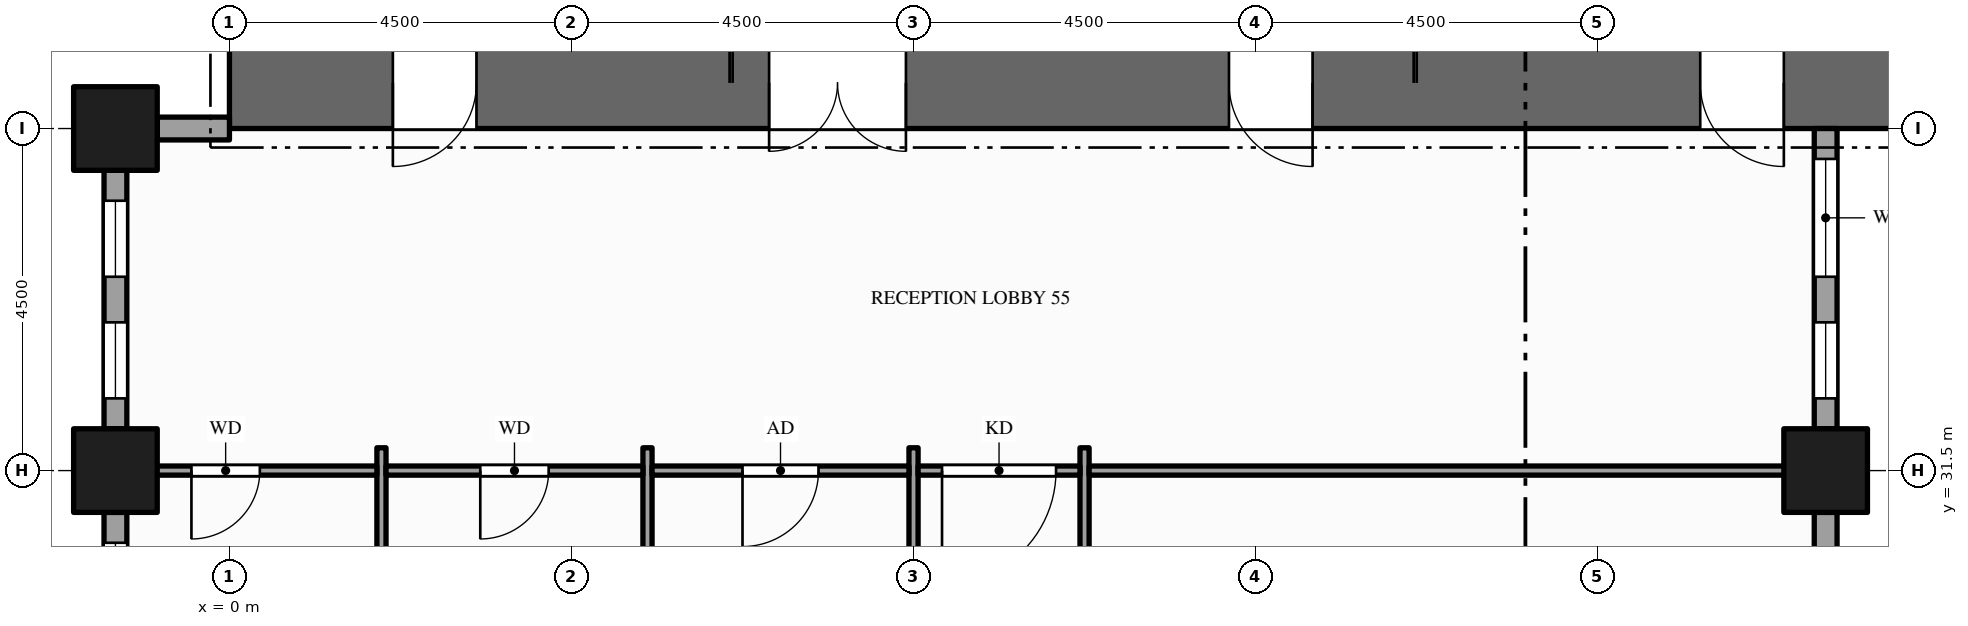
"""IFC4 building model, lengths in metres.
Left out: names, types, materials, properties, quantities, classifications, styles, units other than length and angle.
Written with IfcOpenShell. Run it as: python <this file> out.ifc"""

import sys

from ifc_helpers import new_model, si_unit, direction, frame, frame_2d, origin, origin_2d, place, context, subcontext, project, spatial, rectangle, hollow_rectangle, extrude, element, fill, save


model = new_model("IFC4")
c1 = context("Model", 3, precision=1e-05, world=origin(), true_north=direction((0.0, 1.0)))
c2 = subcontext(c1, "Body", "Model", "MODEL_VIEW")
j1 = project(units=[si_unit("LENGTHUNIT", "METRE"), si_unit("PLANEANGLEUNIT", "RADIAN")], contexts=[c1])
p1 = place(None, origin())
s1 = spatial("IfcSite", under=j1, at=p1, CompositionType="ELEMENT")
p2 = place(p1, origin())
s2 = spatial("IfcBuilding", under=s1, at=p2, CompositionType="ELEMENT")
p3 = place(p2, frame((0.0, 0.0, 73.0)))
s3 = spatial("IfcBuildingStorey", under=s2, at=p3, CompositionType="ELEMENT", Elevation=73.0)
p4 = place(p3, frame((0.0, 36.6, -0.15), z_axis=(0.0, 0.0, 1.0), x_axis=(1.0, 0.0, 0.0)))
e1 = element("IfcWall", 1, at=p4, inside=s3, PredefinedType="SHEAR", context=c2, shape_type="SweptSolid", body=[
    extrude(rectangle(XDim=22.5, YDim=1.2, at=frame_2d((11.25, 0.0))), origin(), (0.0, 0.0, 1.0), 4.0),
])
p5 = place(p4, frame((7.1, 0.0, 0.15)))
e2 = element("IfcOpeningElement", 2, at=p5, cuts=e1, PredefinedType="OPENING", context=c2, shape_type="SweptSolid", body=[
    extrude(rectangle(XDim=1.8, YDim=2.1, at=frame_2d((0.9, 1.05))), frame((0.0, 0.61, 0.0), z_axis=(0.0, -1.0, 0.0), x_axis=(1.0, 0.0, 0.0)), (0.0, 0.0, 1.0), 1.22),
])
p6 = place(p4, frame((13.15, 0.0, 0.15)))
e3 = element("IfcOpeningElement", 3, at=p6, cuts=e1, PredefinedType="OPENING", context=c2, shape_type="SweptSolid", body=[
    extrude(rectangle(XDim=1.1, YDim=2.1, at=frame_2d((0.55, 1.05))), frame((0.0, 0.61, 0.0), z_axis=(0.0, -1.0, 0.0), x_axis=(1.0, 0.0, 0.0)), (0.0, 0.0, 1.0), 1.22),
])
p7 = place(p4, frame((2.15, 0.0, 0.15)))
e4 = element("IfcOpeningElement", 4, at=p7, cuts=e1, PredefinedType="OPENING", context=c2, shape_type="SweptSolid", body=[
    extrude(rectangle(XDim=1.1, YDim=2.1, at=frame_2d((0.55, 1.05))), frame((0.0, 0.61, 0.0), z_axis=(0.0, -1.0, 0.0), x_axis=(1.0, 0.0, 0.0)), (0.0, 0.0, 1.0), 1.22),
])
p8 = place(p4, frame((19.35, 0.0, 0.15)))
e5 = element("IfcOpeningElement", 5, at=p8, cuts=e1, PredefinedType="OPENING", context=c2, shape_type="SweptSolid", body=[
    extrude(rectangle(XDim=1.1, YDim=2.1, at=frame_2d((0.55, 1.05))), frame((0.0, 0.61, 0.0), z_axis=(0.0, -1.0, 0.0), x_axis=(1.0, 0.0, 0.0)), (0.0, 0.0, 1.0), 1.22),
])
for number, where, z_axis, x_axis in (
    (6, (-1.5, 31.5, -0.15), (0.0, 0.0, 1.0), (1.0, 0.0, 0.0)),
    (7, (-1.5, 36.0, -0.15), (0.0, 0.0, 1.0), (1.0, 0.0, 0.0)),
    (8, (21.0, 31.5, -0.15), (0.0, 0.0, 1.0), (1.0, 0.0, 0.0)),
):
    element("IfcColumn", number, at=place(p3, frame(where, z_axis=z_axis, x_axis=x_axis)), inside=s3, PredefinedType="COLUMN", context=c2, shape_type="SweptSolid", body=[
        extrude(hollow_rectangle(XDim=1.1, YDim=1.1, WallThickness=0.06, at=origin_2d()), origin(), (0.0, 0.0, 1.0), 3.9),
    ])
p9 = place(p3, frame((21.0, 29.05, 0.0), z_axis=(0.0, 0.0, 1.0), x_axis=(0.0, 1.0, 0.0)))
e9 = element("IfcWall", 9, at=p9, inside=s3, PredefinedType="STANDARD", context=c2, shape_type="SweptSolid", body=[
    extrude(rectangle(XDim=1.9, YDim=0.3, at=frame_2d((0.95, 0.0))), origin(), (0.0, 0.0, 1.0), 3.044),
])
p10 = place(p3, frame((21.0, 32.05, 0.0), z_axis=(0.0, 0.0, 1.0), x_axis=(0.0, 1.0, 0.0)))
e10 = element("IfcWall", 10, at=p10, inside=s3, PredefinedType="STANDARD", context=c2, shape_type="SweptSolid", body=[
    extrude(rectangle(XDim=3.95, YDim=0.3, at=frame_2d((1.975, 0.0))), origin(), (0.0, 0.0, 1.0), 3.044),
])
p11 = place(p10, frame((0.4, 0.0, 0.9)))
e11 = element("IfcOpeningElement", 11, at=p11, cuts=e10, PredefinedType="OPENING", context=c2, shape_type="SweptSolid", body=[
    extrude(rectangle(XDim=1.0, YDim=2.0, at=frame_2d((0.5, 1.0))), frame((0.0, 0.16, 0.0), z_axis=(0.0, -1.0, 0.0), x_axis=(1.0, 0.0, 0.0)), (0.0, 0.0, 1.0), 0.32),
])
p12 = place(p10, frame((2.0, 0.0, 0.9)))
e12 = element("IfcOpeningElement", 12, at=p12, cuts=e10, PredefinedType="OPENING", context=c2, shape_type="SweptSolid", body=[
    extrude(rectangle(XDim=1.55, YDim=2.0, at=frame_2d((0.775, 1.0))), frame((0.0, 0.16, 0.0), z_axis=(0.0, -1.0, 0.0), x_axis=(1.0, 0.0, 0.0)), (0.0, 0.0, 1.0), 0.32),
])
p13 = place(p3, frame((0.0, 36.0, 0.0), z_axis=(0.0, 0.0, 1.0), x_axis=(-1.0, 0.0, 0.0)))
e13 = element("IfcWall", 13, at=p13, inside=s3, PredefinedType="STANDARD", context=c2, shape_type="SweptSolid", body=[
    extrude(rectangle(XDim=0.95, YDim=0.3, at=frame_2d((0.475, 0.0))), origin(), (0.0, 0.0, 1.0), 3.044),
])
p14 = place(p3, frame((-1.5, 35.45, 0.0), z_axis=(0.0, 0.0, 1.0), x_axis=(0.0, -1.0, 0.0)))
e14 = element("IfcWall", 14, at=p14, inside=s3, PredefinedType="STANDARD", context=c2, shape_type="SweptSolid", body=[
    extrude(rectangle(XDim=3.4, YDim=0.3, at=frame_2d((1.7, 0.0))), origin(), (0.0, 0.0, 1.0), 3.044),
])
p15 = place(p14, frame((0.4, 0.0, 0.9)))
e15 = element("IfcOpeningElement", 15, at=p15, cuts=e14, PredefinedType="OPENING", context=c2, shape_type="SweptSolid", body=[
    extrude(rectangle(XDim=1.0, YDim=2.0, at=frame_2d((0.5, 1.0))), frame((0.0, 0.16, 0.0), z_axis=(0.0, -1.0, 0.0), x_axis=(1.0, 0.0, 0.0)), (0.0, 0.0, 1.0), 0.32),
])
p16 = place(p14, frame((2.0, 0.0, 0.9)))
e16 = element("IfcOpeningElement", 16, at=p16, cuts=e14, PredefinedType="OPENING", context=c2, shape_type="SweptSolid", body=[
    extrude(rectangle(XDim=1.0, YDim=2.0, at=frame_2d((0.5, 1.0))), frame((0.0, 0.16, 0.0), z_axis=(0.0, -1.0, 0.0), x_axis=(1.0, 0.0, 0.0)), (0.0, 0.0, 1.0), 0.32),
])
p17 = place(p3, frame((-1.5, 30.95, 0.0), z_axis=(0.0, 0.0, 1.0), x_axis=(0.0, -1.0, 0.0)))
e17 = element("IfcWall", 17, at=p17, inside=s3, PredefinedType="STANDARD", context=c2, shape_type="SweptSolid", body=[
    extrude(rectangle(XDim=3.4, YDim=0.3, at=frame_2d((1.7, 0.0))), origin(), (0.0, 0.0, 1.0), 3.044),
])
p18 = place(p17, frame((0.4, 0.0, 0.9)))
e18 = element("IfcOpeningElement", 18, at=p18, cuts=e17, PredefinedType="OPENING", context=c2, shape_type="SweptSolid", body=[
    extrude(rectangle(XDim=1.0, YDim=2.0, at=frame_2d((0.5, 1.0))), frame((0.0, 0.16, 0.0), z_axis=(0.0, -1.0, 0.0), x_axis=(1.0, 0.0, 0.0)), (0.0, 0.0, 1.0), 0.32),
])
p19 = place(p17, frame((2.0, 0.0, 0.9)))
e19 = element("IfcOpeningElement", 19, at=p19, cuts=e17, PredefinedType="OPENING", context=c2, shape_type="SweptSolid", body=[
    extrude(rectangle(XDim=1.0, YDim=2.0, at=frame_2d((0.5, 1.0))), frame((0.0, 0.16, 0.0), z_axis=(0.0, -1.0, 0.0), x_axis=(1.0, 0.0, 0.0)), (0.0, 0.0, 1.0), 0.32),
])
for number, where, z_axis, x_axis in (
    (20, (2.0, 26.7, 0.0), (0.0, 0.0, 1.0), (0.0, 1.0, 0.0)),
    (21, (5.5, 26.7, 0.0), (0.0, 0.0, 1.0), (0.0, 1.0, 0.0)),
):
    element("IfcWall", number, at=place(p3, frame(where, z_axis=z_axis, x_axis=x_axis)), inside=s3, PredefinedType="PARTITIONING", context=c2, shape_type="SweptSolid", body=[
        extrude(rectangle(XDim=5.1, YDim=0.12, at=frame_2d((2.55, 0.0))), origin(), (0.0, 0.0, 1.0), 3.75),
    ])
p20 = place(p3, frame((9.0, 10.95, 0.0), z_axis=(0.0, 0.0, 1.0), x_axis=(0.0, 1.0, 0.0)))
e22 = element("IfcWall", 22, at=p20, inside=s3, PredefinedType="PARTITIONING", context=c2, shape_type="SweptSolid", body=[
    extrude(rectangle(XDim=20.85, YDim=0.12, at=frame_2d((10.425, 0.0))), origin(), (0.0, 0.0, 1.0), 2.5),
])
p21 = place(p20, frame((3.9, 0.0, 0.0)))
e23 = element("IfcOpeningElement", 23, at=p21, cuts=e22, PredefinedType="OPENING", context=c2, shape_type="SweptSolid", body=[
    extrude(rectangle(XDim=1.8, YDim=2.1, at=frame_2d((0.9, 1.05))), frame((0.0, 0.07, 0.0), z_axis=(0.0, -1.0, 0.0), x_axis=(1.0, 0.0, 0.0)), (0.0, 0.0, 1.0), 0.14),
])
p22 = place(p20, frame((12.205, 0.0, 0.0)))
e24 = element("IfcOpeningElement", 24, at=p22, cuts=e22, PredefinedType="OPENING", context=c2, shape_type="SweptSolid", body=[
    extrude(rectangle(XDim=1.0, YDim=2.1, at=frame_2d((0.5, 1.05))), frame((0.0, 0.07, 0.0), z_axis=(0.0, -1.0, 0.0), x_axis=(1.0, 0.0, 0.0)), (0.0, 0.0, 1.0), 0.14),
])
p23 = place(p3, frame((11.25, 10.95, 0.0), z_axis=(0.0, 0.0, 1.0), x_axis=(0.0, 1.0, 0.0)))
e25 = element("IfcWall", 25, at=p23, inside=s3, PredefinedType="PARTITIONING", context=c2, shape_type="SweptSolid", body=[
    extrude(rectangle(XDim=20.85, YDim=0.12, at=frame_2d((10.425, 0.0))), origin(), (0.0, 0.0, 1.0), 2.5),
])
p24 = place(p23, frame((4.2, 0.0, 0.0)))
e26 = element("IfcOpeningElement", 26, at=p24, cuts=e25, PredefinedType="OPENING", context=c2, shape_type="SweptSolid", body=[
    extrude(rectangle(XDim=1.2, YDim=2.1, at=frame_2d((0.6, 1.05))), frame((0.0, 0.07, 0.0), z_axis=(0.0, -1.0, 0.0), x_axis=(1.0, 0.0, 0.0)), (0.0, 0.0, 1.0), 0.14),
])
p25 = place(p3, frame((-1.35, 31.5, 0.0), z_axis=(0.0, 0.0, 1.0), x_axis=(1.0, 0.0, 0.0)))
e27 = element("IfcWall", 27, at=p25, inside=s3, PredefinedType="PARTITIONING", context=c2, shape_type="SweptSolid", body=[
    extrude(rectangle(XDim=3.29, YDim=0.12, at=frame_2d((1.645, 0.0))), origin(), (0.0, 0.0, 1.0), 2.35),
])
p26 = place(p25, frame((0.85, 0.0, 0.0)))
e28 = element("IfcOpeningElement", 28, at=p26, cuts=e27, PredefinedType="OPENING", context=c2, shape_type="SweptSolid", body=[
    extrude(rectangle(XDim=0.9, YDim=2.1, at=frame_2d((0.45, 1.05))), frame((0.0, 0.07, 0.0), z_axis=(0.0, -1.0, 0.0), x_axis=(1.0, 0.0, 0.0)), (0.0, 0.0, 1.0), 0.14),
])
p27 = place(p3, frame((2.06, 31.5, 0.0), z_axis=(0.0, 0.0, 1.0), x_axis=(1.0, 0.0, 0.0)))
e29 = element("IfcWall", 29, at=p27, inside=s3, PredefinedType="PARTITIONING", context=c2, shape_type="SweptSolid", body=[
    extrude(rectangle(XDim=3.38, YDim=0.12, at=frame_2d((1.69, 0.0))), origin(), (0.0, 0.0, 1.0), 2.838),
])
p28 = place(p27, frame((1.24, 0.0, 0.0)))
e30 = element("IfcOpeningElement", 30, at=p28, cuts=e29, PredefinedType="OPENING", context=c2, shape_type="SweptSolid", body=[
    extrude(rectangle(XDim=0.9, YDim=2.1, at=frame_2d((0.45, 1.05))), frame((0.0, 0.07, 0.0), z_axis=(0.0, -1.0, 0.0), x_axis=(1.0, 0.0, 0.0)), (0.0, 0.0, 1.0), 0.14),
])
p29 = place(p3, frame((5.56, 31.5, 0.0), z_axis=(0.0, 0.0, 1.0), x_axis=(1.0, 0.0, 0.0)))
e31 = element("IfcWall", 31, at=p29, inside=s3, PredefinedType="PARTITIONING", context=c2, shape_type="SweptSolid", body=[
    extrude(rectangle(XDim=3.38, YDim=0.12, at=frame_2d((1.69, 0.0))), origin(), (0.0, 0.0, 1.0), 2.838),
])
p30 = place(p29, frame((1.19, 0.0, 0.0)))
e32 = element("IfcOpeningElement", 32, at=p30, cuts=e31, PredefinedType="OPENING", context=c2, shape_type="SweptSolid", body=[
    extrude(rectangle(XDim=1.0, YDim=2.1, at=frame_2d((0.5, 1.05))), frame((0.0, 0.07, 0.0), z_axis=(0.0, -1.0, 0.0), x_axis=(1.0, 0.0, 0.0)), (0.0, 0.0, 1.0), 0.14),
])
p31 = place(p3, frame((9.06, 31.5, 0.0), z_axis=(0.0, 0.0, 1.0), x_axis=(1.0, 0.0, 0.0)))
e33 = element("IfcWall", 33, at=p31, inside=s3, PredefinedType="PARTITIONING", context=c2, shape_type="SweptSolid", body=[
    extrude(rectangle(XDim=2.13, YDim=0.12, at=frame_2d((1.065, 0.0))), origin(), (0.0, 0.0, 1.0), 2.838),
])
p32 = place(p31, frame((0.315, 0.0, 0.0)))
e34 = element("IfcOpeningElement", 34, at=p32, cuts=e33, PredefinedType="OPENING", context=c2, shape_type="SweptSolid", body=[
    extrude(rectangle(XDim=1.5, YDim=2.1, at=frame_2d((0.75, 1.05))), frame((0.0, 0.07, 0.0), z_axis=(0.0, -1.0, 0.0), x_axis=(1.0, 0.0, 0.0)), (0.0, 0.0, 1.0), 0.14),
])
p33 = place(p3, frame((11.31, 31.5, 0.0), z_axis=(0.0, 0.0, 1.0), x_axis=(1.0, 0.0, 0.0)))
e35 = element("IfcWall", 35, at=p33, inside=s3, PredefinedType="PARTITIONING", context=c2, shape_type="SweptSolid", body=[
    extrude(rectangle(XDim=9.54, YDim=0.12, at=frame_2d((4.77, 0.0))), origin(), (0.0, 0.0, 1.0), 2.838),
])
p34 = place(p11, origin())
e36 = element("IfcWindow", 36, at=p34, inside=s3, PartitioningType="SINGLE_PANEL", PredefinedType="WINDOW", context=c2, shape_type="SweptSolid", body=[
    extrude(rectangle(XDim=1.0, YDim=2.0, at=frame_2d((0.5, 1.0))), frame((0.0, 0.03, 0.0), z_axis=(0.0, -1.0, 0.0), x_axis=(1.0, 0.0, 0.0)), (0.0, 0.0, 1.0), 0.06),
])
fill(e11, e36)
p35 = place(p12, origin())
e37 = element("IfcWindow", 37, at=p35, inside=s3, PartitioningType="SINGLE_PANEL", PredefinedType="WINDOW", context=c2, shape_type="SweptSolid", body=[
    extrude(rectangle(XDim=1.55, YDim=2.0, at=frame_2d((0.775, 1.0))), frame((0.0, 0.03, 0.0), z_axis=(0.0, -1.0, 0.0), x_axis=(1.0, 0.0, 0.0)), (0.0, 0.0, 1.0), 0.06),
])
fill(e12, e37)
p36 = place(p15, origin())
e38 = element("IfcWindow", 38, at=p36, inside=s3, PartitioningType="SINGLE_PANEL", PredefinedType="WINDOW", context=c2, shape_type="SweptSolid", body=[
    extrude(rectangle(XDim=1.0, YDim=2.0, at=frame_2d((0.5, 1.0))), frame((0.0, 0.03, 0.0), z_axis=(0.0, -1.0, 0.0), x_axis=(1.0, 0.0, 0.0)), (0.0, 0.0, 1.0), 0.06),
])
fill(e15, e38)
p37 = place(p16, origin())
e39 = element("IfcWindow", 39, at=p37, inside=s3, PartitioningType="SINGLE_PANEL", PredefinedType="WINDOW", context=c2, shape_type="SweptSolid", body=[
    extrude(rectangle(XDim=1.0, YDim=2.0, at=frame_2d((0.5, 1.0))), frame((0.0, 0.03, 0.0), z_axis=(0.0, -1.0, 0.0), x_axis=(1.0, 0.0, 0.0)), (0.0, 0.0, 1.0), 0.06),
])
fill(e16, e39)
p38 = place(p18, origin())
e40 = element("IfcWindow", 40, at=p38, inside=s3, PartitioningType="SINGLE_PANEL", PredefinedType="WINDOW", context=c2, shape_type="SweptSolid", body=[
    extrude(rectangle(XDim=1.0, YDim=2.0, at=frame_2d((0.5, 1.0))), frame((0.0, 0.03, 0.0), z_axis=(0.0, -1.0, 0.0), x_axis=(1.0, 0.0, 0.0)), (0.0, 0.0, 1.0), 0.06),
])
fill(e18, e40)
p39 = place(p5, origin())
e41 = element("IfcDoor", 41, at=p39, inside=s3, OperationType="DOUBLE_DOOR_SINGLE_SWING", PredefinedType="DOOR", context=c2, shape_type="SweptSolid", body=[
    extrude(rectangle(XDim=1.8, YDim=2.1, at=frame_2d((0.9, 1.05))), frame((0.0, 0.025, 0.0), z_axis=(0.0, -1.0, 0.0), x_axis=(1.0, 0.0, 0.0)), (0.0, 0.0, 1.0), 0.05),
])
fill(e2, e41)
p40 = place(p6, origin())
e42 = element("IfcDoor", 42, at=p40, inside=s3, OperationType="SINGLE_SWING_RIGHT", PredefinedType="DOOR", context=c2, shape_type="SweptSolid", body=[
    extrude(rectangle(XDim=1.1, YDim=2.1, at=frame_2d((0.55, 1.05))), frame((0.0, 0.025, 0.0), z_axis=(0.0, -1.0, 0.0), x_axis=(1.0, 0.0, 0.0)), (0.0, 0.0, 1.0), 0.05),
])
fill(e3, e42)
p41 = place(p7, origin())
e43 = element("IfcDoor", 43, at=p41, inside=s3, OperationType="SINGLE_SWING_LEFT", PredefinedType="DOOR", context=c2, shape_type="SweptSolid", body=[
    extrude(rectangle(XDim=1.1, YDim=2.1, at=frame_2d((0.55, 1.05))), frame((0.0, 0.025, 0.0), z_axis=(0.0, -1.0, 0.0), x_axis=(1.0, 0.0, 0.0)), (0.0, 0.0, 1.0), 0.05),
])
fill(e4, e43)
p42 = place(p8, origin())
e44 = element("IfcDoor", 44, at=p42, inside=s3, OperationType="SINGLE_SWING_RIGHT", PredefinedType="DOOR", context=c2, shape_type="SweptSolid", body=[
    extrude(rectangle(XDim=1.1, YDim=2.1, at=frame_2d((0.55, 1.05))), frame((0.0, 0.025, 0.0), z_axis=(0.0, -1.0, 0.0), x_axis=(1.0, 0.0, 0.0)), (0.0, 0.0, 1.0), 0.05),
])
fill(e5, e44)
p43 = place(p32, origin())
e45 = element("IfcDoor", 45, at=p43, inside=s3, OperationType="SINGLE_SWING_LEFT", PredefinedType="DOOR", context=c2, shape_type="SweptSolid", body=[
    extrude(rectangle(XDim=1.5, YDim=2.1, at=frame_2d((0.75, 1.05))), frame((0.0, 0.025, 0.0), z_axis=(0.0, -1.0, 0.0), x_axis=(1.0, 0.0, 0.0)), (0.0, 0.0, 1.0), 0.05),
])
fill(e34, e45)
p44 = place(p26, origin())
e46 = element("IfcDoor", 46, at=p44, inside=s3, OperationType="SINGLE_SWING_LEFT", PredefinedType="DOOR", context=c2, shape_type="SweptSolid", body=[
    extrude(rectangle(XDim=0.9, YDim=2.1, at=frame_2d((0.45, 1.05))), frame((0.0, 0.025, 0.0), z_axis=(0.0, -1.0, 0.0), x_axis=(1.0, 0.0, 0.0)), (0.0, 0.0, 1.0), 0.05),
])
fill(e28, e46)
p45 = place(p28, origin())
e47 = element("IfcDoor", 47, at=p45, inside=s3, OperationType="SINGLE_SWING_LEFT", PredefinedType="DOOR", context=c2, shape_type="SweptSolid", body=[
    extrude(rectangle(XDim=0.9, YDim=2.1, at=frame_2d((0.45, 1.05))), frame((0.0, 0.025, 0.0), z_axis=(0.0, -1.0, 0.0), x_axis=(1.0, 0.0, 0.0)), (0.0, 0.0, 1.0), 0.05),
])
fill(e30, e47)
p46 = place(p30, origin())
e48 = element("IfcDoor", 48, at=p46, inside=s3, OperationType="SINGLE_SWING_LEFT", PredefinedType="DOOR", context=c2, shape_type="SweptSolid", body=[
    extrude(rectangle(XDim=1.0, YDim=2.1, at=frame_2d((0.5, 1.05))), frame((0.0, 0.025, 0.0), z_axis=(0.0, -1.0, 0.0), x_axis=(1.0, 0.0, 0.0)), (0.0, 0.0, 1.0), 0.05),
])
fill(e32, e48)
save(model, sys.argv[1])
